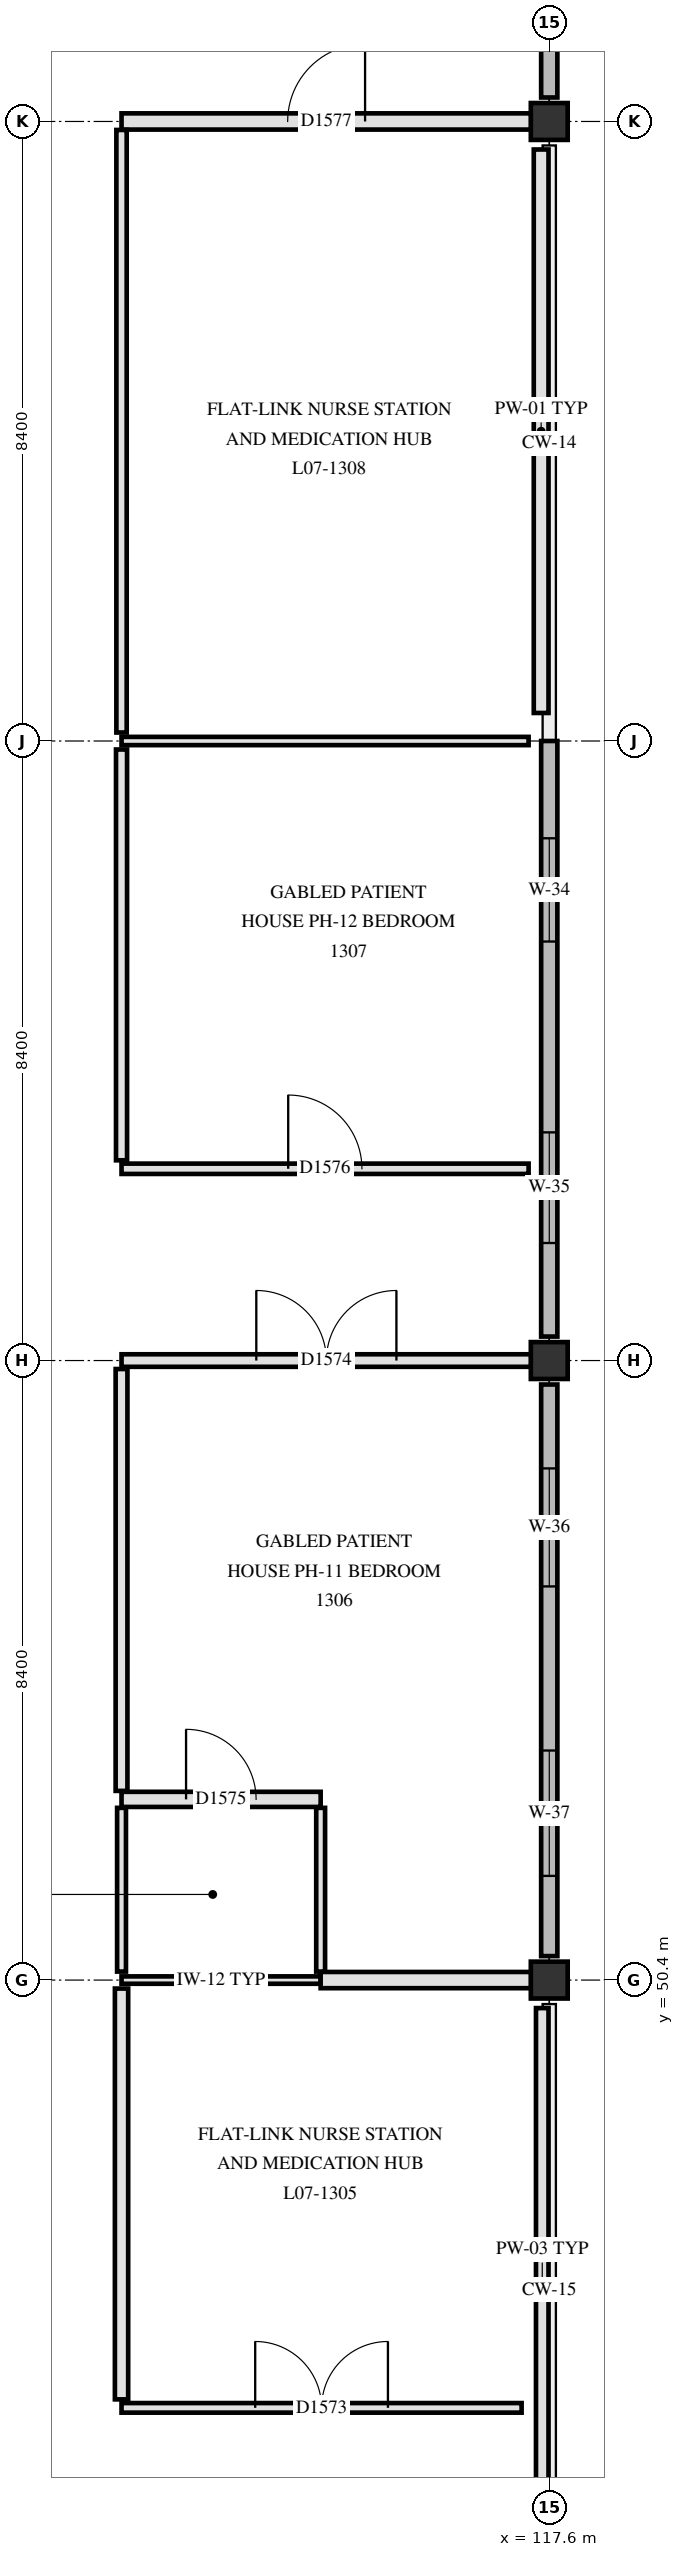
"""IFC4 building model, lengths in metres.
Left out: names, types, materials, properties, quantities, classifications, styles, units other than length and angle.
Written with IfcOpenShell. Run it as: python <this file> out.ifc"""

import sys

from ifc_helpers import new_model, si_unit, direction, frame, frame_2d, origin, origin_2d, place, context, subcontext, project, spatial, polyline, rectangle, outline, extrude, element, fill, save


model = new_model("IFC4")
c1 = context("Model", 3, precision=1e-05, world=origin(), true_north=direction((0.0, 1.0)))
c2 = subcontext(c1, "Body", "Model", "MODEL_VIEW")
j1 = project(units=[si_unit("LENGTHUNIT", "METRE"), si_unit("PLANEANGLEUNIT", "RADIAN")], contexts=[c1])
p1 = place(None, origin())
s1 = spatial("IfcSite", under=j1, at=p1, CompositionType="ELEMENT")
p2 = place(p1, origin())
s2 = spatial("IfcBuilding", under=s1, at=p2, CompositionType="ELEMENT")
p3 = place(p2, frame((0.0, 0.0, 30.3)))
s3 = spatial("IfcBuildingStorey", under=s2, at=p3, CompositionType="ELEMENT", Elevation=30.3)
for number, where, z_axis, x_axis in (
    (1, (117.6, 50.4, 0.0), (0.0, 0.0, 1.0), (1.0, 0.0, 0.0)),
    (2, (117.6, 58.8, 0.0), (0.0, 0.0, 1.0), (1.0, 0.0, 0.0)),
    (3, (117.6, 75.6, 0.0), (0.0, 0.0, 1.0), (1.0, 0.0, 0.0)),
):
    element("IfcColumn", number, at=place(p3, frame(where, z_axis=z_axis, x_axis=x_axis)), inside=s3, PredefinedType="COLUMN", context=c2, shape_type="SweptSolid", body=[
        extrude(rectangle(XDim=0.5, YDim=0.5, at=origin_2d()), origin(), (0.0, 0.0, 1.0), 3.9),
    ])
p4 = place(p3, frame((117.6, 83.675, 0.0), z_axis=(0.0, 0.0, 1.0), x_axis=(0.0, -1.0, 0.0)))
e4 = element("IfcWall", 4, at=p4, inside=s3, PredefinedType="SOLIDWALL", context=c2, shape_type="SweptSolid", body=[
    extrude(outline(polyline([(0.0, 0.0), (7.75, 0.0), (7.75, 3.42), (3.875, 5.76), (0.0, 3.42), (0.0, 0.0)])), frame((0.0, 0.11, 0.0), z_axis=(0.0, -1.0, 0.0), x_axis=(1.0, 0.0, 0.0)), (0.0, 0.0, 1.0), 0.22),
])
p5 = place(p4, frame((1.337, 0.0, 0.85)))
e5 = element("IfcOpeningElement", 5, at=p5, cuts=e4, PredefinedType="OPENING", context=c2, shape_type="SweptSolid", body=[
    extrude(rectangle(XDim=1.2, YDim=1.66, at=frame_2d((0.6, 0.83))), frame((0.0, 0.12, 0.0), z_axis=(0.0, -1.0, 0.0), x_axis=(1.0, 0.0, 0.0)), (0.0, 0.0, 1.0), 0.24),
])
p6 = place(p4, frame((5.163, 0.0, 0.85)))
e6 = element("IfcOpeningElement", 6, at=p6, cuts=e4, PredefinedType="OPENING", context=c2, shape_type="SweptSolid", body=[
    extrude(rectangle(XDim=1.3, YDim=1.66, at=frame_2d((0.65, 0.83))), frame((0.0, 0.12, 0.0), z_axis=(0.0, -1.0, 0.0), x_axis=(1.0, 0.0, 0.0)), (0.0, 0.0, 1.0), 0.24),
])
p7 = place(p3, frame((117.6, 67.2, 0.0), z_axis=(0.0, 0.0, 1.0), x_axis=(0.0, -1.0, 0.0)))
e7 = element("IfcWall", 7, at=p7, inside=s3, PredefinedType="SOLIDWALL", context=c2, shape_type="SweptSolid", body=[
    extrude(outline(polyline([(0.0, 0.0), (8.075, 0.0), (8.075, 3.15), (4.038, 5.847), (0.0, 3.15), (0.0, 0.0)])), frame((0.0, 0.11, 0.0), z_axis=(0.0, -1.0, 0.0), x_axis=(1.0, 0.0, 0.0)), (0.0, 0.0, 1.0), 0.22),
])
p8 = place(p7, frame((1.319, 0.0, 0.85)))
e8 = element("IfcOpeningElement", 8, at=p8, cuts=e7, PredefinedType="OPENING", context=c2, shape_type="SweptSolid", body=[
    extrude(rectangle(XDim=1.4, YDim=1.66, at=frame_2d((0.7, 0.83))), frame((0.0, 0.12, 0.0), z_axis=(0.0, -1.0, 0.0), x_axis=(1.0, 0.0, 0.0)), (0.0, 0.0, 1.0), 0.24),
])
p9 = place(p7, frame((5.306, 0.0, 0.85)))
e9 = element("IfcOpeningElement", 9, at=p9, cuts=e7, PredefinedType="OPENING", context=c2, shape_type="SweptSolid", body=[
    extrude(rectangle(XDim=1.5, YDim=1.66, at=frame_2d((0.75, 0.83))), frame((0.0, 0.12, 0.0), z_axis=(0.0, -1.0, 0.0), x_axis=(1.0, 0.0, 0.0)), (0.0, 0.0, 1.0), 0.24),
])
p10 = place(p3, frame((117.6, 58.475, 0.0), z_axis=(0.0, 0.0, 1.0), x_axis=(0.0, -1.0, 0.0)))
e10 = element("IfcWall", 10, at=p10, inside=s3, PredefinedType="SOLIDWALL", context=c2, shape_type="SweptSolid", body=[
    extrude(outline(polyline([(0.0, 0.0), (7.75, 0.0), (7.75, 3.42), (3.875, 5.76), (0.0, 3.42), (0.0, 0.0)])), frame((0.0, 0.11, 0.0), z_axis=(0.0, -1.0, 0.0), x_axis=(1.0, 0.0, 0.0)), (0.0, 0.0, 1.0), 0.22),
])
p11 = place(p10, frame((1.137, 0.0, 0.85)))
e11 = element("IfcOpeningElement", 11, at=p11, cuts=e10, PredefinedType="OPENING", context=c2, shape_type="SweptSolid", body=[
    extrude(rectangle(XDim=1.6, YDim=1.66, at=frame_2d((0.8, 0.83))), frame((0.0, 0.12, 0.0), z_axis=(0.0, -1.0, 0.0), x_axis=(1.0, 0.0, 0.0)), (0.0, 0.0, 1.0), 0.24),
])
p12 = place(p10, frame((4.962, 0.0, 0.85)))
e12 = element("IfcOpeningElement", 12, at=p12, cuts=e10, PredefinedType="OPENING", context=c2, shape_type="SweptSolid", body=[
    extrude(rectangle(XDim=1.7, YDim=1.66, at=frame_2d((0.85, 0.83))), frame((0.0, 0.12, 0.0), z_axis=(0.0, -1.0, 0.0), x_axis=(1.0, 0.0, 0.0)), (0.0, 0.0, 1.0), 0.24),
])
p13 = place(p3, frame((117.49, 75.22, 3.88), z_axis=(0.0, 0.0, 1.0), x_axis=(0.0, -1.0, 0.0)))
e13 = element("IfcWall", 13, at=p13, inside=s3, PredefinedType="PARAPET", context=c2, shape_type="SweptSolid", body=[
    extrude(rectangle(XDim=7.64, YDim=0.2, at=frame_2d((3.82, 0.0))), origin(), (0.0, 0.0, 1.0), 0.47),
])
p14 = place(p3, frame((117.505, 50.02, 3.88), z_axis=(0.0, 0.0, 1.0), x_axis=(0.0, -1.0, 0.0)))
e14 = element("IfcWall", 14, at=p14, inside=s3, PredefinedType="PARAPET", context=c2, shape_type="SweptSolid", body=[
    extrude(rectangle(XDim=7.64, YDim=0.17, at=frame_2d((3.82, 0.0))), origin(), (0.0, 0.0, 1.0), 0.47),
])
p15 = place(p3, frame((111.8, 44.6, 0.0), z_axis=(0.0, 0.0, 1.0), x_axis=(1.0, 0.0, 0.0)))
e15 = element("IfcWall", 15, at=p15, inside=s3, PredefinedType="PARTITIONING", context=c2, shape_type="SweptSolid", body=[
    extrude(rectangle(XDim=5.425, YDim=0.13, at=frame_2d((2.712, 0.0))), origin(), (0.0, 0.0, 1.0), 3.65),
])
p16 = place(p15, frame((1.812, 0.0, 0.0)))
e16 = element("IfcOpeningElement", 16, at=p16, cuts=e15, PredefinedType="OPENING", context=c2, shape_type="SweptSolid", body=[
    extrude(rectangle(XDim=1.8, YDim=2.25, at=frame_2d((0.9, 1.125))), frame((0.0, 0.075, 0.0), z_axis=(0.0, -1.0, 0.0), x_axis=(1.0, 0.0, 0.0)), (0.0, 0.0, 1.0), 0.15),
])
p17 = place(p3, frame((111.8, 50.4, 0.0), z_axis=(0.0, 0.0, 1.0), x_axis=(1.0, 0.0, 0.0)))
e17 = element("IfcWall", 17, at=p17, inside=s3, PredefinedType="PARTITIONING", context=c2, shape_type="SweptSolid", body=[
    extrude(rectangle(XDim=2.7, YDim=0.1, at=frame_2d((1.35, 0.0))), origin(), (0.0, 0.0, 1.0), 3.25),
])
p18 = place(p3, frame((114.5, 50.4, 0.0), z_axis=(0.0, 0.0, 1.0), x_axis=(1.0, 0.0, 0.0)))
e18 = element("IfcWall", 18, at=p18, inside=s3, PredefinedType="PARTITIONING", context=c2, shape_type="SweptSolid", body=[
    extrude(rectangle(XDim=2.855, YDim=0.22, at=frame_2d((1.427, 0.0))), origin(), (0.0, 0.0, 1.0), 3.25),
])
p19 = place(p3, frame((111.8, 52.85, 0.0), z_axis=(0.0, 0.0, 1.0), x_axis=(1.0, 0.0, 0.0)))
e19 = element("IfcWall", 19, at=p19, inside=s3, PredefinedType="PARTITIONING", context=c2, shape_type="SweptSolid", body=[
    extrude(rectangle(XDim=2.7, YDim=0.205, at=frame_2d((1.35, 0.0))), origin(), (0.0, 0.0, 1.0), 3.65),
])
p20 = place(p19, frame((0.875, 0.0, 0.0)))
e20 = element("IfcOpeningElement", 20, at=p20, cuts=e19, PredefinedType="OPENING", context=c2, shape_type="SweptSolid", body=[
    extrude(rectangle(XDim=0.95, YDim=2.1, at=frame_2d((0.475, 1.05))), frame((0.0, 0.113, 0.0), z_axis=(0.0, -1.0, 0.0), x_axis=(1.0, 0.0, 0.0)), (0.0, 0.0, 1.0), 0.225),
])
p21 = place(p3, frame((111.8, 58.8, 0.0), z_axis=(0.0, 0.0, 1.0), x_axis=(1.0, 0.0, 0.0)))
e21 = element("IfcWall", 21, at=p21, inside=s3, PredefinedType="PARTITIONING", context=c2, shape_type="SweptSolid", body=[
    extrude(rectangle(XDim=5.555, YDim=0.17, at=frame_2d((2.777, 0.0))), origin(), (0.0, 0.0, 1.0), 3.25),
])
p22 = place(p21, frame((1.827, 0.0, 0.0)))
e22 = element("IfcOpeningElement", 22, at=p22, cuts=e21, PredefinedType="OPENING", context=c2, shape_type="SweptSolid", body=[
    extrude(rectangle(XDim=1.9, YDim=2.3, at=frame_2d((0.95, 1.15))), frame((0.0, 0.095, 0.0), z_axis=(0.0, -1.0, 0.0), x_axis=(1.0, 0.0, 0.0)), (0.0, 0.0, 1.0), 0.19),
])
p23 = place(p3, frame((111.8, 61.4, 0.0), z_axis=(0.0, 0.0, 1.0), x_axis=(1.0, 0.0, 0.0)))
e23 = element("IfcWall", 23, at=p23, inside=s3, PredefinedType="PARTITIONING", context=c2, shape_type="SweptSolid", body=[
    extrude(rectangle(XDim=5.52, YDim=0.14, at=frame_2d((2.76, 0.0))), origin(), (0.0, 0.0, 1.0), 3.65),
])
p24 = place(p23, frame((2.26, 0.0, 0.0)))
e24 = element("IfcOpeningElement", 24, at=p24, cuts=e23, PredefinedType="OPENING", context=c2, shape_type="SweptSolid", body=[
    extrude(rectangle(XDim=1.0, YDim=2.15, at=frame_2d((0.5, 1.075))), frame((0.0, 0.08, 0.0), z_axis=(0.0, -1.0, 0.0), x_axis=(1.0, 0.0, 0.0)), (0.0, 0.0, 1.0), 0.16),
])
p25 = place(p3, frame((111.8, 67.2, 0.0), z_axis=(0.0, 0.0, 1.0), x_axis=(1.0, 0.0, 0.0)))
e25 = element("IfcWall", 25, at=p25, inside=s3, PredefinedType="PARTITIONING", context=c2, shape_type="SweptSolid", body=[
    extrude(rectangle(XDim=5.52, YDim=0.112, at=frame_2d((2.76, 0.0))), origin(), (0.0, 0.0, 1.0), 3.65),
])
p26 = place(p3, frame((111.8, 75.6, 0.0), z_axis=(0.0, 0.0, 1.0), x_axis=(1.0, 0.0, 0.0)))
e26 = element("IfcWall", 26, at=p26, inside=s3, PredefinedType="PARTITIONING", context=c2, shape_type="SweptSolid", body=[
    extrude(rectangle(XDim=5.555, YDim=0.22, at=frame_2d((2.777, 0.0))), origin(), (0.0, 0.0, 1.0), 3.25),
])
p27 = place(p26, frame((2.252, 0.0, 0.0)))
e27 = element("IfcOpeningElement", 27, at=p27, cuts=e26, PredefinedType="OPENING", context=c2, shape_type="SweptSolid", body=[
    extrude(rectangle(XDim=1.05, YDim=2.15, at=frame_2d((0.525, 1.075))), frame((0.0, 0.12, 0.0), z_axis=(0.0, -1.0, 0.0), x_axis=(1.0, 0.0, 0.0)), (0.0, 0.0, 1.0), 0.24),
])
p28 = place(p3, frame((111.8, 44.715, 0.0), z_axis=(0.0, 0.0, 1.0), x_axis=(0.0, 1.0, 0.0)))
e28 = element("IfcWall", 28, at=p28, inside=s3, PredefinedType="PARTITIONING", context=c2, shape_type="SweptSolid", body=[
    extrude(rectangle(XDim=5.57, YDim=0.18, at=frame_2d((2.785, 0.0))), origin(), (0.0, 0.0, 1.0), 3.41),
])
p29 = place(p3, frame((111.8, 50.515, 0.0), z_axis=(0.0, 0.0, 1.0), x_axis=(0.0, 1.0, 0.0)))
e29 = element("IfcWall", 29, at=p29, inside=s3, PredefinedType="PARTITIONING", context=c2, shape_type="SweptSolid", body=[
    extrude(rectangle(XDim=2.22, YDim=0.12, at=frame_2d((1.11, 0.0))), origin(), (0.0, 0.0, 1.0), 3.65),
])
p30 = place(p3, frame((111.8, 52.965, 0.0), z_axis=(0.0, 0.0, 1.0), x_axis=(0.0, 1.0, 0.0)))
e30 = element("IfcWall", 30, at=p30, inside=s3, PredefinedType="PARTITIONING", context=c2, shape_type="SweptSolid", body=[
    extrude(rectangle(XDim=5.72, YDim=0.16, at=frame_2d((2.86, 0.0))), origin(), (0.0, 0.0, 1.0), 3.41),
])
p31 = place(p3, frame((111.8, 61.515, 0.0), z_axis=(0.0, 0.0, 1.0), x_axis=(0.0, 1.0, 0.0)))
e31 = element("IfcWall", 31, at=p31, inside=s3, PredefinedType="PARTITIONING", context=c2, shape_type="SweptSolid", body=[
    extrude(rectangle(XDim=5.57, YDim=0.15, at=frame_2d((2.785, 0.0))), origin(), (0.0, 0.0, 1.0), 3.41),
])
p32 = place(p3, frame((111.8, 67.315, 0.0), z_axis=(0.0, 0.0, 1.0), x_axis=(0.0, 1.0, 0.0)))
e32 = element("IfcWall", 32, at=p32, inside=s3, PredefinedType="PARTITIONING", context=c2, shape_type="SweptSolid", body=[
    extrude(rectangle(XDim=8.17, YDim=0.14, at=frame_2d((4.085, 0.0))), origin(), (0.0, 0.0, 1.0), 3.41),
])
p33 = place(p3, frame((114.5, 50.515, 0.0), z_axis=(0.0, 0.0, 1.0), x_axis=(0.0, 1.0, 0.0)))
e33 = element("IfcWall", 33, at=p33, inside=s3, PredefinedType="PARTITIONING", context=c2, shape_type="SweptSolid", body=[
    extrude(rectangle(XDim=2.22, YDim=0.12, at=frame_2d((1.11, 0.0))), origin(), (0.0, 0.0, 1.0), 3.65),
])
p34 = place(p8, origin())
e34 = element("IfcWindow", 34, at=p34, inside=s3, PartitioningType="SINGLE_PANEL", PredefinedType="WINDOW", context=c2, shape_type="SweptSolid", body=[
    extrude(rectangle(XDim=1.4, YDim=1.66, at=frame_2d((0.7, 0.83))), frame((0.0, 0.03, 0.0), z_axis=(0.0, -1.0, 0.0), x_axis=(1.0, 0.0, 0.0)), (0.0, 0.0, 1.0), 0.06),
])
fill(e8, e34)
p35 = place(p9, origin())
e35 = element("IfcWindow", 35, at=p35, inside=s3, PartitioningType="SINGLE_PANEL", PredefinedType="WINDOW", context=c2, shape_type="SweptSolid", body=[
    extrude(rectangle(XDim=1.5, YDim=1.66, at=frame_2d((0.75, 0.83))), frame((0.0, 0.03, 0.0), z_axis=(0.0, -1.0, 0.0), x_axis=(1.0, 0.0, 0.0)), (0.0, 0.0, 1.0), 0.06),
])
fill(e9, e35)
p36 = place(p11, origin())
e36 = element("IfcWindow", 36, at=p36, inside=s3, PartitioningType="SINGLE_PANEL", PredefinedType="WINDOW", context=c2, shape_type="SweptSolid", body=[
    extrude(rectangle(XDim=1.6, YDim=1.66, at=frame_2d((0.8, 0.83))), frame((0.0, 0.03, 0.0), z_axis=(0.0, -1.0, 0.0), x_axis=(1.0, 0.0, 0.0)), (0.0, 0.0, 1.0), 0.06),
])
fill(e11, e36)
p37 = place(p12, origin())
e37 = element("IfcWindow", 37, at=p37, inside=s3, PartitioningType="SINGLE_PANEL", PredefinedType="WINDOW", context=c2, shape_type="SweptSolid", body=[
    extrude(rectangle(XDim=1.7, YDim=1.66, at=frame_2d((0.85, 0.83))), frame((0.0, 0.03, 0.0), z_axis=(0.0, -1.0, 0.0), x_axis=(1.0, 0.0, 0.0)), (0.0, 0.0, 1.0), 0.06),
])
fill(e12, e37)
p38 = place(p16, origin())
e38 = element("IfcDoor", 38, at=p38, inside=s3, OperationType="DOUBLE_SWING_RIGHT", PredefinedType="DOOR", context=c2, shape_type="SweptSolid", body=[
    extrude(rectangle(XDim=1.8, YDim=2.25, at=frame_2d((0.9, 1.125))), frame((0.0, 0.025, 0.0), z_axis=(0.0, -1.0, 0.0), x_axis=(1.0, 0.0, 0.0)), (0.0, 0.0, 1.0), 0.05),
])
fill(e16, e38)
p39 = place(p22, origin())
e39 = element("IfcDoor", 39, at=p39, inside=s3, OperationType="DOUBLE_SWING_LEFT", PredefinedType="DOOR", context=c2, shape_type="SweptSolid", body=[
    extrude(rectangle(XDim=1.9, YDim=2.3, at=frame_2d((0.95, 1.15))), frame((0.0, 0.025, 0.0), z_axis=(0.0, -1.0, 0.0), x_axis=(1.0, 0.0, 0.0)), (0.0, 0.0, 1.0), 0.05),
])
fill(e22, e39)
p40 = place(p20, origin())
e40 = element("IfcDoor", 40, at=p40, inside=s3, OperationType="SINGLE_SWING_LEFT", PredefinedType="DOOR", context=c2, shape_type="SweptSolid", body=[
    extrude(rectangle(XDim=0.95, YDim=2.1, at=frame_2d((0.475, 1.05))), frame((0.0, 0.025, 0.0), z_axis=(0.0, -1.0, 0.0), x_axis=(1.0, 0.0, 0.0)), (0.0, 0.0, 1.0), 0.05),
])
fill(e20, e40)
p41 = place(p24, origin())
e41 = element("IfcDoor", 41, at=p41, inside=s3, OperationType="SINGLE_SWING_LEFT", PredefinedType="DOOR", context=c2, shape_type="SweptSolid", body=[
    extrude(rectangle(XDim=1.0, YDim=2.15, at=frame_2d((0.5, 1.075))), frame((0.0, 0.025, 0.0), z_axis=(0.0, -1.0, 0.0), x_axis=(1.0, 0.0, 0.0)), (0.0, 0.0, 1.0), 0.05),
])
fill(e24, e41)
p42 = place(p27, origin())
e42 = element("IfcDoor", 42, at=p42, inside=s3, OperationType="SINGLE_SWING_RIGHT", PredefinedType="DOOR", context=c2, shape_type="SweptSolid", body=[
    extrude(rectangle(XDim=1.05, YDim=2.15, at=frame_2d((0.525, 1.075))), frame((0.0, 0.025, 0.0), z_axis=(0.0, -1.0, 0.0), x_axis=(1.0, 0.0, 0.0)), (0.0, 0.0, 1.0), 0.05),
])
fill(e27, e42)
save(model, sys.argv[1])
